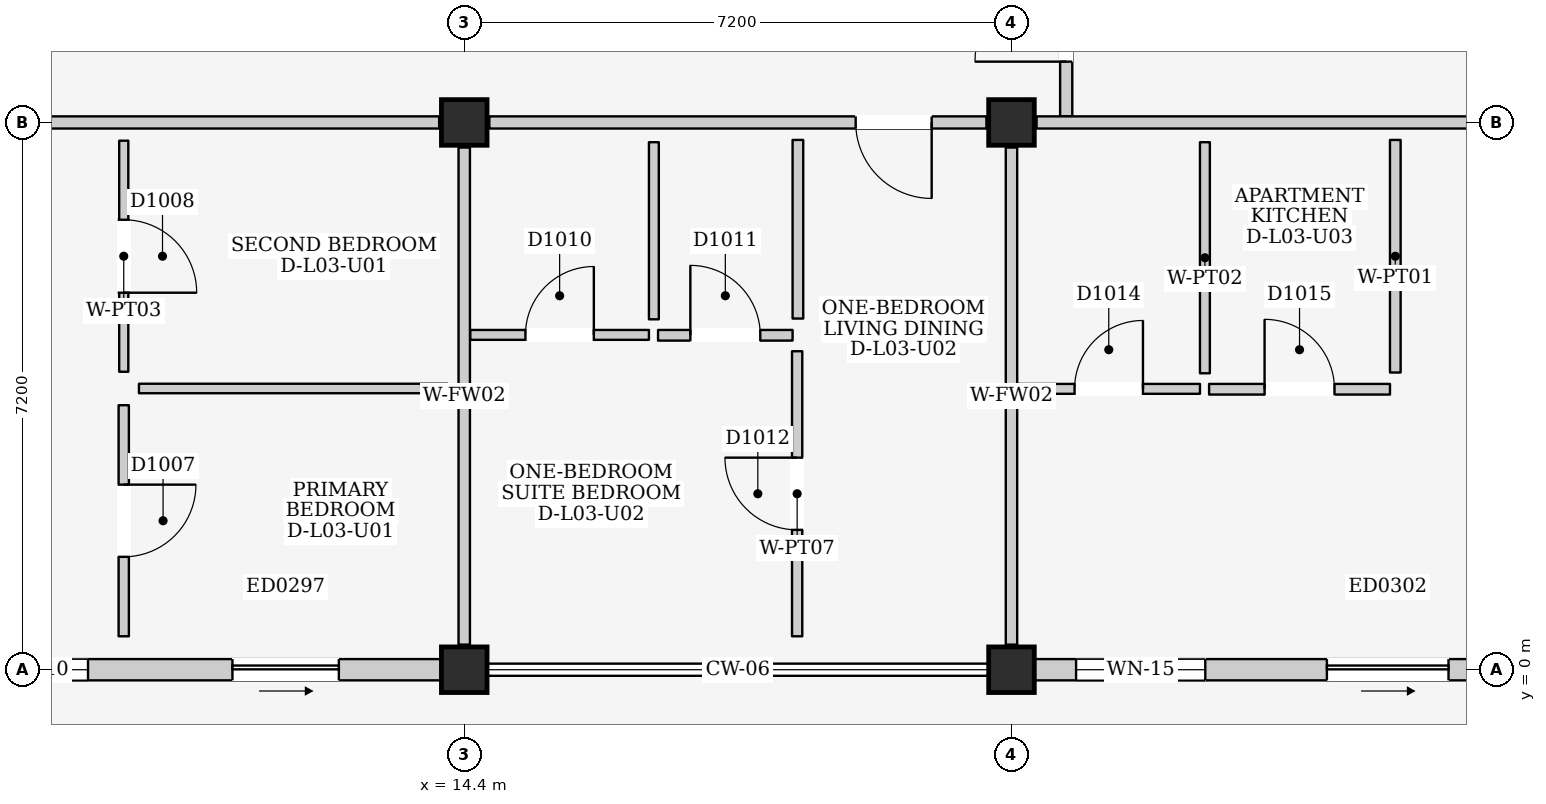
"""IFC4 building model, lengths in metres.
Left out: names, types, materials, properties, quantities, classifications, styles, units other than length and angle.
Written with IfcOpenShell. Run it as: python <this file> out.ifc"""

import sys

from ifc_helpers import new_model, si_unit, direction, frame, frame_2d, origin, origin_2d, place, context, subcontext, project, spatial, rectangle, extrude, element, fill, save


model = new_model("IFC4")
c1 = context("Model", 3, precision=1e-05, world=origin(), true_north=direction((0.0, 1.0)))
c2 = subcontext(c1, "Body", "Model", "MODEL_VIEW")
j1 = project(units=[si_unit("LENGTHUNIT", "METRE"), si_unit("PLANEANGLEUNIT", "RADIAN")], contexts=[c1])
p1 = place(None, origin())
s1 = spatial("IfcSite", under=j1, at=p1, CompositionType="ELEMENT")
p2 = place(p1, origin())
s2 = spatial("IfcBuilding", under=s1, at=p2, CompositionType="ELEMENT")
p3 = place(p2, frame((0.0, 0.0, 12.2)))
s3 = spatial("IfcBuildingStorey", under=s2, at=p3, CompositionType="ELEMENT", Elevation=12.2)
for number, where, z_axis, x_axis in (
    (1, (14.4, 0.0, 0.0), (0.0, 0.0, 1.0), (1.0, 0.0, 0.0)),
    (2, (14.4, 7.2, 0.0), (0.0, 0.0, 1.0), (1.0, 0.0, 0.0)),
    (3, (21.6, 0.0, 0.0), (0.0, 0.0, 1.0), (1.0, 0.0, 0.0)),
    (4, (21.6, 7.2, 0.0), (0.0, 0.0, 1.0), (1.0, 0.0, 0.0)),
):
    element("IfcColumn", number, at=place(p3, frame(where, z_axis=z_axis, x_axis=x_axis)), inside=s3, PredefinedType="COLUMN", context=c2, shape_type="SweptSolid", body=[
        extrude(rectangle(XDim=0.6, YDim=0.6, at=origin_2d()), origin(), (0.0, 0.0, 1.0), 3.2),
    ])
p4 = place(p3, frame((7.5, 0.0, 0.0), z_axis=(0.0, 0.0, 1.0), x_axis=(1.0, 0.0, 0.0)))
e5 = element("IfcWall", 5, at=p4, inside=s3, PredefinedType="ELEMENTEDWALL", context=c2, shape_type="SweptSolid", body=[
    extrude(rectangle(XDim=6.6, YDim=0.28, at=frame_2d((3.3, 0.0))), origin(), (0.0, 0.0, 1.0), 2.445),
])
p5 = place(p4, frame((3.85, 0.0, 0.0)))
e6 = element("IfcOpeningElement", 6, at=p5, cuts=e5, PredefinedType="OPENING", context=c2, shape_type="SweptSolid", body=[
    extrude(rectangle(XDim=1.4, YDim=2.1, at=frame_2d((0.7, 1.05))), frame((0.0, 0.155, 0.0), z_axis=(0.0, -1.0, 0.0), x_axis=(1.0, 0.0, 0.0)), (0.0, 0.0, 1.0), 0.31),
])
p6 = place(p4, frame((0.55, 0.0, 0.9)))
e7 = element("IfcOpeningElement", 7, at=p6, cuts=e5, PredefinedType="OPENING", context=c2, shape_type="SweptSolid", body=[
    extrude(rectangle(XDim=1.4, YDim=1.2, at=frame_2d((0.7, 0.6))), frame((0.0, 0.155, 0.0), z_axis=(0.0, -1.0, 0.0), x_axis=(1.0, 0.0, 0.0)), (0.0, 0.0, 1.0), 0.31),
])
p7 = place(p3, frame((21.9, 0.0, 0.0), z_axis=(0.0, 0.0, 1.0), x_axis=(1.0, 0.0, 0.0)))
e8 = element("IfcWall", 8, at=p7, inside=s3, PredefinedType="ELEMENTEDWALL", context=c2, shape_type="SweptSolid", body=[
    extrude(rectangle(XDim=6.6, YDim=0.28, at=frame_2d((3.3, 0.0))), origin(), (0.0, 0.0, 1.0), 2.445),
])
p8 = place(p7, frame((3.85, 0.0, 0.0)))
e9 = element("IfcOpeningElement", 9, at=p8, cuts=e8, PredefinedType="OPENING", context=c2, shape_type="SweptSolid", body=[
    extrude(rectangle(XDim=1.6, YDim=2.12, at=frame_2d((0.8, 1.06))), frame((0.0, 0.155, 0.0), z_axis=(0.0, -1.0, 0.0), x_axis=(1.0, 0.0, 0.0)), (0.0, 0.0, 1.0), 0.31),
])
p9 = place(p7, frame((0.55, 0.0, 0.885)))
e10 = element("IfcOpeningElement", 10, at=p9, cuts=e8, PredefinedType="OPENING", context=c2, shape_type="SweptSolid", body=[
    extrude(rectangle(XDim=1.7, YDim=1.45, at=frame_2d((0.85, 0.725))), frame((0.0, 0.155, 0.0), z_axis=(0.0, -1.0, 0.0), x_axis=(1.0, 0.0, 0.0)), (0.0, 0.0, 1.0), 0.31),
])
p10 = place(p3, frame((22.32, 7.28, 0.0), z_axis=(0.0, 0.0, 1.0), x_axis=(0.0, 1.0, 0.0)))
e11 = element("IfcWall", 11, at=p10, inside=s3, PredefinedType="PARTITIONING", context=c2, shape_type="SweptSolid", body=[
    extrude(rectangle(XDim=4.32, YDim=0.16, at=frame_2d((2.16, 0.0))), origin(), (0.0, 0.0, 1.0), 2.98),
])
p11 = place(p10, frame((0.72, 0.0, 0.0)))
e12 = element("IfcOpeningElement", 12, at=p11, cuts=e11, PredefinedType="OPENING", context=c2, shape_type="SweptSolid", body=[
    extrude(rectangle(XDim=1.2, YDim=2.2, at=frame_2d((0.6, 1.1))), frame((0.0, 0.095, 0.0), z_axis=(0.0, -1.0, 0.0), x_axis=(1.0, 0.0, 0.0)), (0.0, 0.0, 1.0), 0.19),
])
p12 = place(p3, frame((7.53, 7.2, 0.0), z_axis=(0.0, 0.0, 1.0), x_axis=(1.0, 0.0, 0.0)))
e13 = element("IfcWall", 13, at=p12, inside=s3, PredefinedType="PARTITIONING", context=c2, shape_type="SweptSolid", body=[
    extrude(rectangle(XDim=6.54, YDim=0.16, at=frame_2d((3.27, 0.0))), origin(), (0.0, 0.0, 1.0), 2.365),
])
p13 = place(p3, frame((14.4, 0.33, 0.0), z_axis=(0.0, 0.0, 1.0), x_axis=(0.0, 1.0, 0.0)))
e14 = element("IfcWall", 14, at=p13, inside=s3, PredefinedType="PARTITIONING", context=c2, shape_type="SweptSolid", body=[
    extrude(rectangle(XDim=6.54, YDim=0.15, at=frame_2d((3.27, 0.0))), origin(), (0.0, 0.0, 1.0), 2.415),
])
p14 = place(p3, frame((9.92, 0.44, 0.0), z_axis=(0.0, 0.0, 1.0), x_axis=(0.0, 1.0, 0.0)))
e15 = element("IfcWall", 15, at=p14, inside=s3, PredefinedType="PARTITIONING", context=c2, shape_type="SweptSolid", body=[
    extrude(rectangle(XDim=3.04, YDim=0.135, at=frame_2d((1.52, 0.0))), origin(), (0.0, 0.0, 1.0), 2.98),
])
p15 = place(p14, frame((1.045, 0.0, 0.0)))
e16 = element("IfcOpeningElement", 16, at=p15, cuts=e15, PredefinedType="OPENING", context=c2, shape_type="SweptSolid", body=[
    extrude(rectangle(XDim=0.95, YDim=2.15, at=frame_2d((0.475, 1.075))), frame((0.0, 0.083, 0.0), z_axis=(0.0, -1.0, 0.0), x_axis=(1.0, 0.0, 0.0)), (0.0, 0.0, 1.0), 0.165),
])
p16 = place(p3, frame((10.12, 3.7, 0.0), z_axis=(0.0, 0.0, 1.0), x_axis=(1.0, 0.0, 0.0)))
e17 = element("IfcWall", 17, at=p16, inside=s3, PredefinedType="PARTITIONING", context=c2, shape_type="SweptSolid", body=[
    extrude(rectangle(XDim=4.06, YDim=0.125, at=frame_2d((2.03, 0.0))), origin(), (0.0, 0.0, 1.0), 2.98),
])
p17 = place(p3, frame((9.92, 3.92, 0.0), z_axis=(0.0, 0.0, 1.0), x_axis=(0.0, 1.0, 0.0)))
e18 = element("IfcWall", 18, at=p17, inside=s3, PredefinedType="PARTITIONING", context=c2, shape_type="SweptSolid", body=[
    extrude(rectangle(XDim=3.04, YDim=0.12, at=frame_2d((1.52, 0.0))), origin(), (0.0, 0.0, 1.0), 2.98),
])
p18 = place(p17, frame((1.04, 0.0, 0.0)))
e19 = element("IfcOpeningElement", 19, at=p18, cuts=e18, PredefinedType="OPENING", context=c2, shape_type="SweptSolid", body=[
    extrude(rectangle(XDim=0.96, YDim=2.15, at=frame_2d((0.48, 1.075))), frame((0.0, 0.075, 0.0), z_axis=(0.0, -1.0, 0.0), x_axis=(1.0, 0.0, 0.0)), (0.0, 0.0, 1.0), 0.15),
])
p19 = place(p3, frame((14.73, 7.2, 0.0), z_axis=(0.0, 0.0, 1.0), x_axis=(1.0, 0.0, 0.0)))
e20 = element("IfcWall", 20, at=p19, inside=s3, PredefinedType="PARTITIONING", context=c2, shape_type="SweptSolid", body=[
    extrude(rectangle(XDim=6.54, YDim=0.16, at=frame_2d((3.27, 0.0))), origin(), (0.0, 0.0, 1.0), 2.365),
])
p20 = place(p19, frame((4.82, 0.0, 0.0)))
e21 = element("IfcOpeningElement", 21, at=p20, cuts=e20, PredefinedType="OPENING", context=c2, shape_type="SweptSolid", body=[
    extrude(rectangle(XDim=1.0, YDim=2.15, at=frame_2d((0.5, 1.075))), frame((0.0, 0.095, 0.0), z_axis=(0.0, -1.0, 0.0), x_axis=(1.0, 0.0, 0.0)), (0.0, 0.0, 1.0), 0.19),
])
p21 = place(p3, frame((21.6, 0.33, 0.0), z_axis=(0.0, 0.0, 1.0), x_axis=(0.0, 1.0, 0.0)))
e22 = element("IfcWall", 22, at=p21, inside=s3, PredefinedType="PARTITIONING", context=c2, shape_type="SweptSolid", body=[
    extrude(rectangle(XDim=6.54, YDim=0.15, at=frame_2d((3.27, 0.0))), origin(), (0.0, 0.0, 1.0), 2.415),
])
p22 = place(p3, frame((14.48, 4.405, 0.0), z_axis=(0.0, 0.0, 1.0), x_axis=(1.0, 0.0, 0.0)))
e23 = element("IfcWall", 23, at=p22, inside=s3, PredefinedType="PARTITIONING", context=c2, shape_type="SweptSolid", body=[
    extrude(rectangle(XDim=2.35, YDim=0.13, at=frame_2d((1.175, 0.0))), origin(), (0.0, 0.0, 1.0), 2.98),
])
p23 = place(p22, frame((0.725, 0.0, 0.0)))
e24 = element("IfcOpeningElement", 24, at=p23, cuts=e23, PredefinedType="OPENING", context=c2, shape_type="SweptSolid", body=[
    extrude(rectangle(XDim=0.9, YDim=2.1, at=frame_2d((0.45, 1.05))), frame((0.0, 0.08, 0.0), z_axis=(0.0, -1.0, 0.0), x_axis=(1.0, 0.0, 0.0)), (0.0, 0.0, 1.0), 0.16),
])
p24 = place(p3, frame((16.895, 4.61, 0.0), z_axis=(0.0, 0.0, 1.0), x_axis=(0.0, 1.0, 0.0)))
e25 = element("IfcWall", 25, at=p24, inside=s3, PredefinedType="PARTITIONING", context=c2, shape_type="SweptSolid", body=[
    extrude(rectangle(XDim=2.33, YDim=0.13, at=frame_2d((1.165, 0.0))), origin(), (0.0, 0.0, 1.0), 2.98),
])
p25 = place(p3, frame((16.95, 4.4, 0.0), z_axis=(0.0, 0.0, 1.0), x_axis=(1.0, 0.0, 0.0)))
e26 = element("IfcWall", 26, at=p25, inside=s3, PredefinedType="PARTITIONING", context=c2, shape_type="SweptSolid", body=[
    extrude(rectangle(XDim=1.77, YDim=0.14, at=frame_2d((0.885, 0.0))), origin(), (0.0, 0.0, 1.0), 2.98),
])
p26 = place(p25, frame((0.425, 0.0, 0.0)))
e27 = element("IfcOpeningElement", 27, at=p26, cuts=e26, PredefinedType="OPENING", context=c2, shape_type="SweptSolid", body=[
    extrude(rectangle(XDim=0.92, YDim=2.1, at=frame_2d((0.46, 1.05))), frame((0.0, 0.085, 0.0), z_axis=(0.0, -1.0, 0.0), x_axis=(1.0, 0.0, 0.0)), (0.0, 0.0, 1.0), 0.17),
])
p27 = place(p3, frame((18.79, 4.62, 0.0), z_axis=(0.0, 0.0, 1.0), x_axis=(0.0, 1.0, 0.0)))
e28 = element("IfcWall", 28, at=p27, inside=s3, PredefinedType="PARTITIONING", context=c2, shape_type="SweptSolid", body=[
    extrude(rectangle(XDim=2.35, YDim=0.14, at=frame_2d((1.175, 0.0))), origin(), (0.0, 0.0, 1.0), 2.98),
])
p28 = place(p3, frame((18.78, 0.44, 0.0), z_axis=(0.0, 0.0, 1.0), x_axis=(0.0, 1.0, 0.0)))
e29 = element("IfcWall", 29, at=p28, inside=s3, PredefinedType="PARTITIONING", context=c2, shape_type="SweptSolid", body=[
    extrude(rectangle(XDim=3.75, YDim=0.135, at=frame_2d((1.875, 0.0))), origin(), (0.0, 0.0, 1.0), 2.98),
])
p29 = place(p28, frame((1.4, 0.0, 0.0)))
e30 = element("IfcOpeningElement", 30, at=p29, cuts=e29, PredefinedType="OPENING", context=c2, shape_type="SweptSolid", body=[
    extrude(rectangle(XDim=0.95, YDim=2.15, at=frame_2d((0.475, 1.075))), frame((0.0, 0.083, 0.0), z_axis=(0.0, -1.0, 0.0), x_axis=(1.0, 0.0, 0.0)), (0.0, 0.0, 1.0), 0.165),
])
p30 = place(p3, frame((21.93, 7.2, 0.0), z_axis=(0.0, 0.0, 1.0), x_axis=(1.0, 0.0, 0.0)))
e31 = element("IfcWall", 31, at=p30, inside=s3, PredefinedType="PARTITIONING", context=c2, shape_type="SweptSolid", body=[
    extrude(rectangle(XDim=6.54, YDim=0.16, at=frame_2d((3.27, 0.0))), origin(), (0.0, 0.0, 1.0), 2.365),
])
p31 = place(p3, frame((21.68, 3.695, 0.0), z_axis=(0.0, 0.0, 1.0), x_axis=(1.0, 0.0, 0.0)))
e32 = element("IfcWall", 32, at=p31, inside=s3, PredefinedType="PARTITIONING", context=c2, shape_type="SweptSolid", body=[
    extrude(rectangle(XDim=2.4, YDim=0.13, at=frame_2d((1.2, 0.0))), origin(), (0.0, 0.0, 1.0), 2.98),
])
p32 = place(p31, frame((0.75, 0.0, 0.0)))
e33 = element("IfcOpeningElement", 33, at=p32, cuts=e32, PredefinedType="OPENING", context=c2, shape_type="SweptSolid", body=[
    extrude(rectangle(XDim=0.9, YDim=2.1, at=frame_2d((0.45, 1.05))), frame((0.0, 0.08, 0.0), z_axis=(0.0, -1.0, 0.0), x_axis=(1.0, 0.0, 0.0)), (0.0, 0.0, 1.0), 0.16),
])
p33 = place(p3, frame((24.145, 3.9, 0.0), z_axis=(0.0, 0.0, 1.0), x_axis=(0.0, 1.0, 0.0)))
e34 = element("IfcWall", 34, at=p33, inside=s3, PredefinedType="PARTITIONING", context=c2, shape_type="SweptSolid", body=[
    extrude(rectangle(XDim=3.04, YDim=0.13, at=frame_2d((1.52, 0.0))), origin(), (0.0, 0.0, 1.0), 2.98),
])
p34 = place(p3, frame((24.2, 3.69, 0.0), z_axis=(0.0, 0.0, 1.0), x_axis=(1.0, 0.0, 0.0)))
e35 = element("IfcWall", 35, at=p34, inside=s3, PredefinedType="PARTITIONING", context=c2, shape_type="SweptSolid", body=[
    extrude(rectangle(XDim=2.38, YDim=0.14, at=frame_2d((1.19, 0.0))), origin(), (0.0, 0.0, 1.0), 2.98),
])
p35 = place(p34, frame((0.73, 0.0, 0.0)))
e36 = element("IfcOpeningElement", 36, at=p35, cuts=e35, PredefinedType="OPENING", context=c2, shape_type="SweptSolid", body=[
    extrude(rectangle(XDim=0.92, YDim=2.1, at=frame_2d((0.46, 1.05))), frame((0.0, 0.085, 0.0), z_axis=(0.0, -1.0, 0.0), x_axis=(1.0, 0.0, 0.0)), (0.0, 0.0, 1.0), 0.17),
])
p36 = place(p3, frame((26.65, 3.91, 0.0), z_axis=(0.0, 0.0, 1.0), x_axis=(0.0, 1.0, 0.0)))
e37 = element("IfcWall", 37, at=p36, inside=s3, PredefinedType="PARTITIONING", context=c2, shape_type="SweptSolid", body=[
    extrude(rectangle(XDim=3.06, YDim=0.14, at=frame_2d((1.53, 0.0))), origin(), (0.0, 0.0, 1.0), 2.98),
])
p37 = place(p5, frame((1.4, 0.0, 0.0), z_axis=(0.0, 0.0, 1.0), x_axis=(-1.0, 0.0, 0.0)))
e38 = element("IfcDoor", 38, at=p37, inside=s3, OperationType="SLIDING_TO_RIGHT", PredefinedType="DOOR", context=c2, shape_type="SweptSolid", body=[
    extrude(rectangle(XDim=1.4, YDim=2.1, at=frame_2d((0.7, 1.05))), frame((0.0, 0.025, 0.0), z_axis=(0.0, -1.0, 0.0), x_axis=(1.0, 0.0, 0.0)), (0.0, 0.0, 1.0), 0.05),
])
fill(e6, e38)
p38 = place(p6, origin())
e39 = element("IfcWindow", 39, at=p38, inside=s3, PartitioningType="DOUBLE_PANEL_HORIZONTAL", PredefinedType="WINDOW", context=c2, shape_type="SweptSolid", body=[
    extrude(rectangle(XDim=1.4, YDim=1.2, at=frame_2d((0.7, 0.6))), frame((0.0, 0.03, 0.0), z_axis=(0.0, -1.0, 0.0), x_axis=(1.0, 0.0, 0.0)), (0.0, 0.0, 1.0), 0.06),
])
fill(e7, e39)
p39 = place(p8, frame((1.6, 0.0, 0.0), z_axis=(0.0, 0.0, 1.0), x_axis=(-1.0, 0.0, 0.0)))
e40 = element("IfcDoor", 40, at=p39, inside=s3, OperationType="SLIDING_TO_RIGHT", PredefinedType="DOOR", context=c2, shape_type="SweptSolid", body=[
    extrude(rectangle(XDim=1.6, YDim=2.12, at=frame_2d((0.8, 1.06))), frame((0.0, 0.025, 0.0), z_axis=(0.0, -1.0, 0.0), x_axis=(1.0, 0.0, 0.0)), (0.0, 0.0, 1.0), 0.05),
])
fill(e9, e40)
p40 = place(p9, origin())
e41 = element("IfcWindow", 41, at=p40, inside=s3, PartitioningType="DOUBLE_PANEL_VERTICAL", PredefinedType="WINDOW", context=c2, shape_type="SweptSolid", body=[
    extrude(rectangle(XDim=1.7, YDim=1.45, at=frame_2d((0.85, 0.725))), frame((0.0, 0.03, 0.0), z_axis=(0.0, -1.0, 0.0), x_axis=(1.0, 0.0, 0.0)), (0.0, 0.0, 1.0), 0.06),
])
fill(e10, e41)
p41 = place(p11, origin())
e42 = element("IfcDoor", 42, at=p41, inside=s3, OperationType="SINGLE_SWING_LEFT", PredefinedType="DOOR", context=c2, shape_type="SweptSolid", body=[
    extrude(rectangle(XDim=1.2, YDim=2.2, at=frame_2d((0.6, 1.1))), frame((0.0, 0.025, 0.0), z_axis=(0.0, -1.0, 0.0), x_axis=(1.0, 0.0, 0.0)), (0.0, 0.0, 1.0), 0.05),
])
fill(e12, e42)
p42 = place(p15, frame((0.95, 0.0, 0.0), z_axis=(0.0, 0.0, 1.0), x_axis=(-1.0, 0.0, 0.0)))
e43 = element("IfcDoor", 43, at=p42, inside=s3, OperationType="SINGLE_SWING_LEFT", PredefinedType="DOOR", context=c2, shape_type="SweptSolid", body=[
    extrude(rectangle(XDim=0.95, YDim=2.15, at=frame_2d((0.475, 1.075))), frame((0.0, 0.025, 0.0), z_axis=(0.0, -1.0, 0.0), x_axis=(1.0, 0.0, 0.0)), (0.0, 0.0, 1.0), 0.05),
])
fill(e16, e43)
p43 = place(p18, frame((0.96, 0.0, 0.0), z_axis=(0.0, 0.0, 1.0), x_axis=(-1.0, 0.0, 0.0)))
e44 = element("IfcDoor", 44, at=p43, inside=s3, OperationType="SINGLE_SWING_RIGHT", PredefinedType="DOOR", context=c2, shape_type="SweptSolid", body=[
    extrude(rectangle(XDim=0.96, YDim=2.15, at=frame_2d((0.48, 1.075))), frame((0.0, 0.025, 0.0), z_axis=(0.0, -1.0, 0.0), x_axis=(1.0, 0.0, 0.0)), (0.0, 0.0, 1.0), 0.05),
])
fill(e19, e44)
p44 = place(p20, frame((1.0, 0.0, 0.0), z_axis=(0.0, 0.0, 1.0), x_axis=(-1.0, 0.0, 0.0)))
e45 = element("IfcDoor", 45, at=p44, inside=s3, OperationType="SINGLE_SWING_LEFT", PredefinedType="DOOR", context=c2, shape_type="SweptSolid", body=[
    extrude(rectangle(XDim=1.0, YDim=2.15, at=frame_2d((0.5, 1.075))), frame((0.0, 0.025, 0.0), z_axis=(0.0, -1.0, 0.0), x_axis=(1.0, 0.0, 0.0)), (0.0, 0.0, 1.0), 0.05),
])
fill(e21, e45)
p45 = place(p23, origin())
e46 = element("IfcDoor", 46, at=p45, inside=s3, OperationType="SINGLE_SWING_RIGHT", PredefinedType="DOOR", context=c2, shape_type="SweptSolid", body=[
    extrude(rectangle(XDim=0.9, YDim=2.1, at=frame_2d((0.45, 1.05))), frame((0.0, 0.025, 0.0), z_axis=(0.0, -1.0, 0.0), x_axis=(1.0, 0.0, 0.0)), (0.0, 0.0, 1.0), 0.05),
])
fill(e24, e46)
p46 = place(p26, origin())
e47 = element("IfcDoor", 47, at=p46, inside=s3, OperationType="SINGLE_SWING_LEFT", PredefinedType="DOOR", context=c2, shape_type="SweptSolid", body=[
    extrude(rectangle(XDim=0.92, YDim=2.1, at=frame_2d((0.46, 1.05))), frame((0.0, 0.025, 0.0), z_axis=(0.0, -1.0, 0.0), x_axis=(1.0, 0.0, 0.0)), (0.0, 0.0, 1.0), 0.05),
])
fill(e27, e47)
p47 = place(p29, origin())
e48 = element("IfcDoor", 48, at=p47, inside=s3, OperationType="SINGLE_SWING_RIGHT", PredefinedType="DOOR", context=c2, shape_type="SweptSolid", body=[
    extrude(rectangle(XDim=0.95, YDim=2.15, at=frame_2d((0.475, 1.075))), frame((0.0, 0.025, 0.0), z_axis=(0.0, -1.0, 0.0), x_axis=(1.0, 0.0, 0.0)), (0.0, 0.0, 1.0), 0.05),
])
fill(e30, e48)
p48 = place(p32, origin())
e49 = element("IfcDoor", 49, at=p48, inside=s3, OperationType="SINGLE_SWING_RIGHT", PredefinedType="DOOR", context=c2, shape_type="SweptSolid", body=[
    extrude(rectangle(XDim=0.9, YDim=2.1, at=frame_2d((0.45, 1.05))), frame((0.0, 0.025, 0.0), z_axis=(0.0, -1.0, 0.0), x_axis=(1.0, 0.0, 0.0)), (0.0, 0.0, 1.0), 0.05),
])
fill(e33, e49)
p49 = place(p35, origin())
e50 = element("IfcDoor", 50, at=p49, inside=s3, OperationType="SINGLE_SWING_LEFT", PredefinedType="DOOR", context=c2, shape_type="SweptSolid", body=[
    extrude(rectangle(XDim=0.92, YDim=2.1, at=frame_2d((0.46, 1.05))), frame((0.0, 0.025, 0.0), z_axis=(0.0, -1.0, 0.0), x_axis=(1.0, 0.0, 0.0)), (0.0, 0.0, 1.0), 0.05),
])
fill(e36, e50)
save(model, sys.argv[1])
